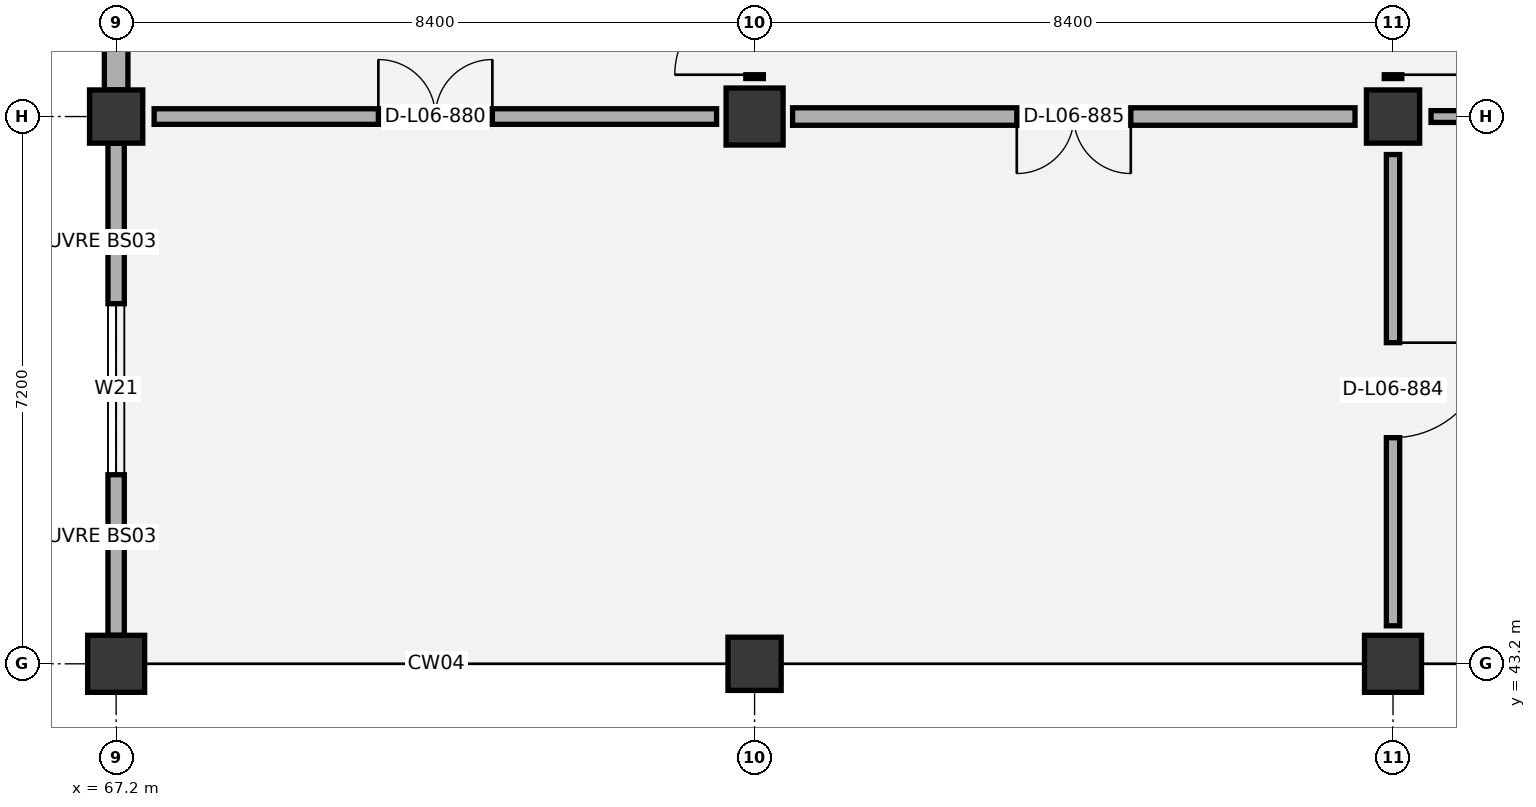
"""IFC4 building model, lengths in metres.
Left out: names, types, materials, properties, quantities, classifications, styles, units other than length and angle.
Written with IfcOpenShell. Run it as: python <this file> out.ifc"""

import sys

from ifc_helpers import new_model, si_unit, direction, frame, frame_2d, origin, origin_2d, place, context, subcontext, project, spatial, rectangle, extrude, element, fill, save


model = new_model("IFC4")
c1 = context("Model", 3, precision=1e-05, world=origin(), true_north=direction((0.0, 1.0)))
c2 = subcontext(c1, "Body", "Model", "MODEL_VIEW")
j1 = project(units=[si_unit("LENGTHUNIT", "METRE"), si_unit("PLANEANGLEUNIT", "RADIAN")], contexts=[c1])
p1 = place(None, origin())
s1 = spatial("IfcSite", under=j1, at=p1, CompositionType="ELEMENT")
p2 = place(p1, origin())
s2 = spatial("IfcBuilding", under=s1, at=p2, CompositionType="ELEMENT")
p3 = place(p2, frame((0.0, 0.0, 31.2)))
s3 = spatial("IfcBuildingStorey", under=s2, at=p3, CompositionType="ELEMENT", Elevation=31.2)
p4 = place(p3, frame((67.2, 43.2, 0.0), z_axis=(0.0, 0.0, 1.0), x_axis=(1.0, 0.0, 0.0)))
e1 = element("IfcColumn", 1, at=p4, inside=s3, PredefinedType="COLUMN", context=c2, shape_type="SweptSolid", body=[
    extrude(rectangle(XDim=0.75, YDim=0.75, at=origin_2d()), origin(), (0.0, 0.0, 1.0), 4.2),
])
for number, where, z_axis, x_axis in (
    (2, (67.2, 50.4, 0.0), (0.0, 0.0, 1.0), (1.0, 0.0, 0.0)),
    (3, (75.6, 43.2, 0.0), (0.0, 0.0, 1.0), (1.0, 0.0, 0.0)),
):
    element("IfcColumn", number, at=place(p3, frame(where, z_axis=z_axis, x_axis=x_axis)), inside=s3, PredefinedType="COLUMN", context=c2, shape_type="SweptSolid", body=[
        extrude(rectangle(XDim=0.7, YDim=0.7, at=origin_2d()), origin(), (0.0, 0.0, 1.0), 4.2),
    ])
for number, where, z_axis, x_axis in (
    (4, (75.6, 50.4, 0.0), (0.0, 0.0, 1.0), (1.0, 0.0, 0.0)),
    (5, (84.0, 43.2, 0.0), (0.0, 0.0, 1.0), (1.0, 0.0, 0.0)),
):
    element("IfcColumn", number, at=place(p3, frame(where, z_axis=z_axis, x_axis=x_axis)), inside=s3, PredefinedType="COLUMN", context=c2, shape_type="SweptSolid", body=[
        extrude(rectangle(XDim=0.75, YDim=0.75, at=origin_2d()), origin(), (0.0, 0.0, 1.0), 4.2),
    ])
p5 = place(p3, frame((84.0, 50.4, 0.0), z_axis=(0.0, 0.0, 1.0), x_axis=(1.0, 0.0, 0.0)))
e6 = element("IfcColumn", 6, at=p5, inside=s3, PredefinedType="COLUMN", context=c2, shape_type="SweptSolid", body=[
    extrude(rectangle(XDim=0.7, YDim=0.7, at=origin_2d()), origin(), (0.0, 0.0, 1.0), 4.2),
])
p6 = place(p3, frame((67.2, 43.575, 0.0), z_axis=(0.0, 0.0, 1.0), x_axis=(0.0, 1.0, 0.0)))
e7 = element("IfcWall", 7, at=p6, inside=s3, PredefinedType="SOLIDWALL", context=c2, shape_type="SweptSolid", body=[
    extrude(rectangle(XDim=6.475, YDim=0.215, at=frame_2d((3.238, 0.0))), origin(), (0.0, 0.0, 1.0), 3.365),
])
p7 = place(p6, frame((2.113, 0.0, 0.9)))
e8 = element("IfcOpeningElement", 8, at=p7, cuts=e7, PredefinedType="OPENING", context=c2, shape_type="SweptSolid", body=[
    extrude(rectangle(XDim=2.25, YDim=1.95, at=frame_2d((1.125, 0.975))), frame((0.0, 0.117, 0.0), z_axis=(0.0, -1.0, 0.0), x_axis=(1.0, 0.0, 0.0)), (0.0, 0.0, 1.0), 0.235),
])
p8 = place(p3, frame((67.2, 50.75, 0.0), z_axis=(0.0, 0.0, 1.0), x_axis=(0.0, 1.0, 0.0)))
e9 = element("IfcWall", 9, at=p8, inside=s3, PredefinedType="SOLIDWALL", context=c2, shape_type="SweptSolid", body=[
    extrude(rectangle(XDim=6.475, YDim=0.31, at=frame_2d((3.238, 0.0))), origin(), (0.0, 0.0, 1.0), 3.365),
])
p9 = place(p8, frame((1.158, 0.0, 0.9)))
e10 = element("IfcOpeningElement", 10, at=p9, cuts=e9, PredefinedType="OPENING", context=c2, shape_type="SweptSolid", body=[
    extrude(rectangle(XDim=1.5, YDim=1.8, at=frame_2d((0.75, 0.9))), frame((0.0, 0.165, 0.0), z_axis=(0.0, -1.0, 0.0), x_axis=(1.0, 0.0, 0.0)), (0.0, 0.0, 1.0), 0.33),
])
p10 = place(p8, frame((3.817, 0.0, 0.9)))
e11 = element("IfcOpeningElement", 11, at=p10, cuts=e9, PredefinedType="OPENING", context=c2, shape_type="SweptSolid", body=[
    extrude(rectangle(XDim=1.5, YDim=1.8, at=frame_2d((0.75, 0.9))), frame((0.0, 0.165, 0.0), z_axis=(0.0, -1.0, 0.0), x_axis=(1.0, 0.0, 0.0)), (0.0, 0.0, 1.0), 0.33),
])
p11 = place(p3, frame((67.7, 50.4, 0.0), z_axis=(0.0, 0.0, 1.0), x_axis=(1.0, 0.0, 0.0)))
e12 = element("IfcWall", 12, at=p11, inside=s3, PredefinedType="PARTITIONING", context=c2, shape_type="SweptSolid", body=[
    extrude(rectangle(XDim=7.4, YDim=0.205, at=frame_2d((3.7, 0.0))), origin(), (0.0, 0.0, 1.0), 3.265),
])
p12 = place(p11, frame((2.95, 0.0, 0.0)))
e13 = element("IfcOpeningElement", 13, at=p12, cuts=e12, PredefinedType="OPENING", context=c2, shape_type="SweptSolid", body=[
    extrude(rectangle(XDim=1.5, YDim=2.2, at=frame_2d((0.75, 1.1))), frame((0.0, 0.113, 0.0), z_axis=(0.0, -1.0, 0.0), x_axis=(1.0, 0.0, 0.0)), (0.0, 0.0, 1.0), 0.225),
])
p13 = place(p3, frame((75.6, 50.9, 0.0), z_axis=(0.0, 0.0, 1.0), x_axis=(0.0, 1.0, 0.0)))
e14 = element("IfcWall", 14, at=p13, inside=s3, PredefinedType="PARTITIONING", context=c2, shape_type="SweptSolid", body=[
    extrude(rectangle(XDim=6.2, YDim=0.23, at=frame_2d((3.1, 0.0))), origin(), (0.0, 0.0, 1.0), 3.415),
])
p14 = place(p13, frame((0.05, 0.0, 0.0)))
e15 = element("IfcOpeningElement", 15, at=p14, cuts=e14, PredefinedType="OPENING", context=c2, shape_type="SweptSolid", body=[
    extrude(rectangle(XDim=1.05, YDim=2.15, at=frame_2d((0.525, 1.075))), frame((0.0, 0.125, 0.0), z_axis=(0.0, -1.0, 0.0), x_axis=(1.0, 0.0, 0.0)), (0.0, 0.0, 1.0), 0.25),
])
p15 = place(p3, frame((84.0, 43.7, 0.0), z_axis=(0.0, 0.0, 1.0), x_axis=(0.0, 1.0, 0.0)))
e16 = element("IfcWall", 16, at=p15, inside=s3, PredefinedType="PARTITIONING", context=c2, shape_type="SweptSolid", body=[
    extrude(rectangle(XDim=6.2, YDim=0.175, at=frame_2d((3.1, 0.0))), origin(), (0.0, 0.0, 1.0), 3.415),
])
p16 = place(p15, frame((2.475, 0.0, 0.0)))
e17 = element("IfcOpeningElement", 17, at=p16, cuts=e16, PredefinedType="OPENING", context=c2, shape_type="SweptSolid", body=[
    extrude(rectangle(XDim=1.25, YDim=2.1, at=frame_2d((0.625, 1.05))), frame((0.0, 0.097, 0.0), z_axis=(0.0, -1.0, 0.0), x_axis=(1.0, 0.0, 0.0)), (0.0, 0.0, 1.0), 0.195),
])
p17 = place(p3, frame((76.1, 50.4, 0.0), z_axis=(0.0, 0.0, 1.0), x_axis=(1.0, 0.0, 0.0)))
e18 = element("IfcWall", 18, at=p17, inside=s3, PredefinedType="PARTITIONING", context=c2, shape_type="SweptSolid", body=[
    extrude(rectangle(XDim=7.4, YDim=0.23, at=frame_2d((3.7, 0.0))), origin(), (0.0, 0.0, 1.0), 3.265),
])
p18 = place(p17, frame((2.95, 0.0, 0.0)))
e19 = element("IfcOpeningElement", 19, at=p18, cuts=e18, PredefinedType="OPENING", context=c2, shape_type="SweptSolid", body=[
    extrude(rectangle(XDim=1.5, YDim=2.15, at=frame_2d((0.75, 1.075))), frame((0.0, 0.125, 0.0), z_axis=(0.0, -1.0, 0.0), x_axis=(1.0, 0.0, 0.0)), (0.0, 0.0, 1.0), 0.25),
])
p19 = place(p3, frame((84.0, 50.9, 0.0), z_axis=(0.0, 0.0, 1.0), x_axis=(0.0, 1.0, 0.0)))
e20 = element("IfcWall", 20, at=p19, inside=s3, PredefinedType="PARTITIONING", context=c2, shape_type="SweptSolid", body=[
    extrude(rectangle(XDim=6.2, YDim=0.23, at=frame_2d((3.1, 0.0))), origin(), (0.0, 0.0, 1.0), 3.315),
])
p20 = place(p19, frame((0.05, 0.0, 0.0)))
e21 = element("IfcOpeningElement", 21, at=p20, cuts=e20, PredefinedType="OPENING", context=c2, shape_type="SweptSolid", body=[
    extrude(rectangle(XDim=1.05, YDim=2.15, at=frame_2d((0.525, 1.075))), frame((0.0, 0.125, 0.0), z_axis=(0.0, -1.0, 0.0), x_axis=(1.0, 0.0, 0.0)), (0.0, 0.0, 1.0), 0.25),
])
p21 = place(p3, frame((84.5, 50.4, 0.0), z_axis=(0.0, 0.0, 1.0), x_axis=(1.0, 0.0, 0.0)))
e22 = element("IfcWall", 22, at=p21, inside=s3, PredefinedType="PARTITIONING", context=c2, shape_type="SweptSolid", body=[
    extrude(rectangle(XDim=7.4, YDim=0.155, at=frame_2d((3.7, 0.0))), origin(), (0.0, 0.0, 1.0), 3.265),
])
p22 = place(p21, frame((3.125, 0.0, 0.0)))
e23 = element("IfcOpeningElement", 23, at=p22, cuts=e22, PredefinedType="OPENING", context=c2, shape_type="SweptSolid", body=[
    extrude(rectangle(XDim=1.15, YDim=2.1, at=frame_2d((0.575, 1.05))), frame((0.0, 0.087, 0.0), z_axis=(0.0, -1.0, 0.0), x_axis=(1.0, 0.0, 0.0)), (0.0, 0.0, 1.0), 0.175),
])
p23 = place(p7, origin())
e24 = element("IfcWindow", 24, at=p23, inside=s3, PartitioningType="SINGLE_PANEL", PredefinedType="WINDOW", context=c2, shape_type="SweptSolid", body=[
    extrude(rectangle(XDim=2.25, YDim=1.95, at=frame_2d((1.125, 0.975))), frame((0.0, 0.03, 0.0), z_axis=(0.0, -1.0, 0.0), x_axis=(1.0, 0.0, 0.0)), (0.0, 0.0, 1.0), 0.06),
])
fill(e8, e24)
p24 = place(p12, origin())
e25 = element("IfcDoor", 25, at=p24, inside=s3, OperationType="DOUBLE_DOOR_SINGLE_SWING", PredefinedType="DOOR", context=c2, shape_type="SweptSolid", body=[
    extrude(rectangle(XDim=1.5, YDim=2.2, at=frame_2d((0.75, 1.1))), frame((0.0, 0.025, 0.0), z_axis=(0.0, -1.0, 0.0), x_axis=(1.0, 0.0, 0.0)), (0.0, 0.0, 1.0), 0.05),
])
fill(e13, e25)
p25 = place(p14, origin())
e26 = element("IfcDoor", 26, at=p25, inside=s3, OperationType="SINGLE_SWING_LEFT", PredefinedType="DOOR", context=c2, shape_type="SweptSolid", body=[
    extrude(rectangle(XDim=1.05, YDim=2.15, at=frame_2d((0.525, 1.075))), frame((0.0, 0.025, 0.0), z_axis=(0.0, -1.0, 0.0), x_axis=(1.0, 0.0, 0.0)), (0.0, 0.0, 1.0), 0.05),
])
fill(e15, e26)
p26 = place(p16, frame((1.25, 0.0, 0.0), z_axis=(0.0, 0.0, 1.0), x_axis=(-1.0, 0.0, 0.0)))
e27 = element("IfcDoor", 27, at=p26, inside=s3, OperationType="SINGLE_SWING_LEFT", PredefinedType="DOOR", context=c2, shape_type="SweptSolid", body=[
    extrude(rectangle(XDim=1.25, YDim=2.1, at=frame_2d((0.625, 1.05))), frame((0.0, 0.025, 0.0), z_axis=(0.0, -1.0, 0.0), x_axis=(1.0, 0.0, 0.0)), (0.0, 0.0, 1.0), 0.05),
])
fill(e17, e27)
p27 = place(p18, frame((1.5, 0.0, 0.0), z_axis=(0.0, 0.0, 1.0), x_axis=(-1.0, 0.0, 0.0)))
e28 = element("IfcDoor", 28, at=p27, inside=s3, OperationType="DOUBLE_DOOR_SINGLE_SWING", PredefinedType="DOOR", context=c2, shape_type="SweptSolid", body=[
    extrude(rectangle(XDim=1.5, YDim=2.15, at=frame_2d((0.75, 1.075))), frame((0.0, 0.025, 0.0), z_axis=(0.0, -1.0, 0.0), x_axis=(1.0, 0.0, 0.0)), (0.0, 0.0, 1.0), 0.05),
])
fill(e19, e28)
p28 = place(p20, frame((1.05, 0.0, 0.0), z_axis=(0.0, 0.0, 1.0), x_axis=(-1.0, 0.0, 0.0)))
e29 = element("IfcDoor", 29, at=p28, inside=s3, OperationType="SINGLE_SWING_RIGHT", PredefinedType="DOOR", context=c2, shape_type="SweptSolid", body=[
    extrude(rectangle(XDim=1.05, YDim=2.15, at=frame_2d((0.525, 1.075))), frame((0.0, 0.025, 0.0), z_axis=(0.0, -1.0, 0.0), x_axis=(1.0, 0.0, 0.0)), (0.0, 0.0, 1.0), 0.05),
])
fill(e21, e29)
save(model, sys.argv[1])
